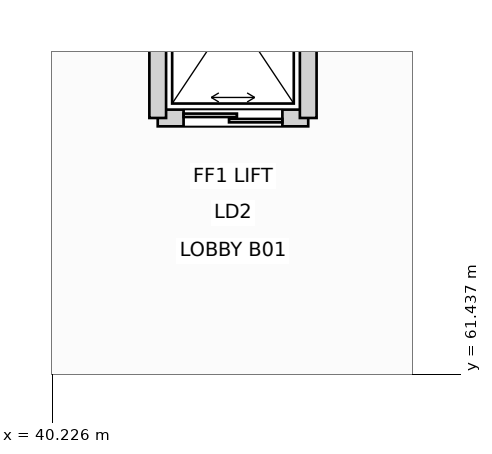
"""IFC4 building model, lengths in metres.
Left out: names, types, materials, properties, quantities, classifications, styles, units other than length and angle.
Written with IfcOpenShell. Run it as: python <this file> out.ifc"""

import sys

from ifc_helpers import new_model, si_unit, direction, frame, frame_2d, origin, place, context, subcontext, project, spatial, rectangle, extrude, element, fill, save


model = new_model("IFC4")
c1 = context("Model", 3, precision=1e-05, world=origin(), true_north=direction((0.0, 1.0)))
c2 = subcontext(c1, "Body", "Model", "MODEL_VIEW")
j1 = project(units=[si_unit("LENGTHUNIT", "METRE"), si_unit("PLANEANGLEUNIT", "RADIAN")], contexts=[c1])
p1 = place(None, origin())
s1 = spatial("IfcSite", under=j1, at=p1, CompositionType="ELEMENT")
p2 = place(p1, origin())
s2 = spatial("IfcBuilding", under=s1, at=p2, CompositionType="ELEMENT")
p3 = place(p2, frame((0.0, 0.0, -5.4)))
s3 = spatial("IfcBuildingStorey", under=s2, at=p3, CompositionType="ELEMENT", Elevation=-5.4)
p4 = place(p3, frame((41.61, 64.81, 0.0), z_axis=(0.0, 0.0, 1.0), x_axis=(1.0, 0.0, 0.0)))
e1 = element("IfcWall", 1, at=p4, inside=s3, PredefinedType="PARTITIONING", context=c2, shape_type="SweptSolid", body=[
    extrude(rectangle(XDim=1.98, YDim=0.22, at=frame_2d((0.99, 0.0))), origin(), (0.0, 0.0, 1.0), 5.045),
])
p5 = place(p4, frame((0.34, 0.0, 0.0)))
e2 = element("IfcOpeningElement", 2, at=p5, cuts=e1, PredefinedType="OPENING", context=c2, shape_type="SweptSolid", body=[
    extrude(rectangle(XDim=1.3, YDim=2.2, at=frame_2d((0.65, 1.1))), frame((0.0, 0.12, 0.0), z_axis=(0.0, -1.0, 0.0), x_axis=(1.0, 0.0, 0.0)), (0.0, 0.0, 1.0), 0.24),
])
for number, where, z_axis, x_axis in (
    (3, (41.61, 64.81, 0.0), (0.0, 0.0, 1.0), (0.0, 1.0, 0.0)),
    (4, (43.59, 64.81, 0.0), (0.0, 0.0, 1.0), (0.0, 1.0, 0.0)),
):
    element("IfcWall", number, at=place(p3, frame(where, z_axis=z_axis, x_axis=x_axis)), inside=s3, PredefinedType="PARTITIONING", context=c2, shape_type="SweptSolid", body=[
        extrude(rectangle(XDim=2.78, YDim=0.22, at=frame_2d((1.39, 0.0))), origin(), (0.0, 0.0, 1.0), 4.745),
    ])
p6 = place(p5, origin())
e5 = element("IfcDoor", 5, at=p6, inside=s3, OperationType="DOUBLE_DOOR_SLIDING", PredefinedType="DOOR", context=c2, shape_type="SweptSolid", body=[
    extrude(rectangle(XDim=1.3, YDim=2.2, at=frame_2d((0.65, 1.1))), frame((0.0, 0.025, 0.0), z_axis=(0.0, -1.0, 0.0), x_axis=(1.0, 0.0, 0.0)), (0.0, 0.0, 1.0), 0.05),
])
fill(e2, e5)
save(model, sys.argv[1])
